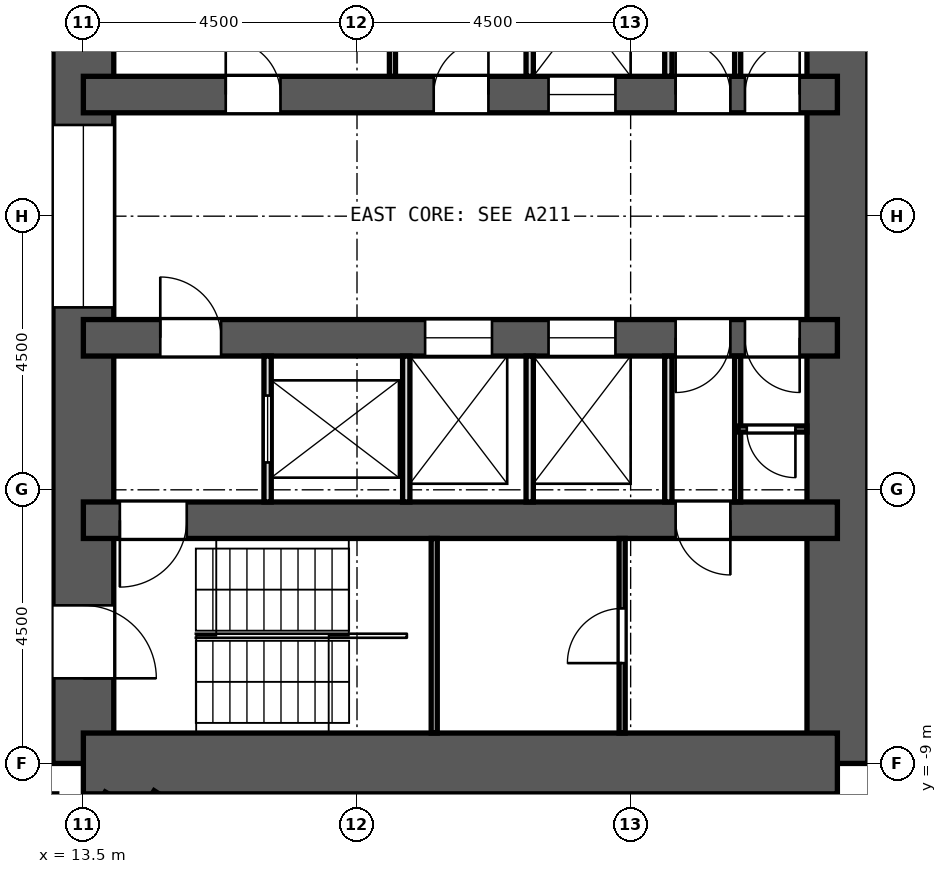
"""IFC4 building model, lengths in metres.
Left out: names, types, materials, properties, quantities, classifications, styles, units other than length and angle.
Written with IfcOpenShell. Run it as: python <this file> out.ifc"""

import sys

from ifc_helpers import new_model, si_unit, direction, frame, frame_2d, origin, place, context, subcontext, project, spatial, rectangle, extrude, element, fill, save


model = new_model("IFC4")
c1 = context("Model", 3, precision=1e-05, world=origin(), true_north=direction((0.0, 1.0)))
c2 = subcontext(c1, "Body", "Model", "MODEL_VIEW")
j1 = project(units=[si_unit("LENGTHUNIT", "METRE"), si_unit("PLANEANGLEUNIT", "RADIAN")], contexts=[c1])
p1 = place(None, origin())
s1 = spatial("IfcSite", under=j1, at=p1, CompositionType="ELEMENT")
p2 = place(p1, origin())
s2 = spatial("IfcBuilding", under=s1, at=p2, CompositionType="ELEMENT")
p3 = place(p2, frame((0.0, 0.0, 46.1)))
s3 = spatial("IfcBuildingStorey", under=s2, at=p3, CompositionType="ELEMENT", Elevation=46.1)
p4 = place(p3, frame((13.5, -9.0, 0.0), z_axis=(0.0, 0.0, 1.0), x_axis=(0.0, 1.0, 0.0)))
e1 = element("IfcWall", 1, at=p4, inside=s3, PredefinedType="SHEAR", context=c2, shape_type="SweptSolid", body=[
    extrude(rectangle(XDim=18.0, YDim=1.0, at=frame_2d((9.0, 0.0))), origin(), (0.0, 0.0, 1.0), 3.3),
])
p5 = place(p4, frame((15.4, 0.0, 0.0)))
e2 = element("IfcOpeningElement", 2, at=p5, cuts=e1, PredefinedType="OPENING", context=c2, shape_type="SweptSolid", body=[
    extrude(rectangle(XDim=1.2, YDim=2.1, at=frame_2d((0.6, 1.05))), frame((0.0, 0.512, 0.0), z_axis=(0.0, -1.0, 0.0), x_axis=(1.0, 0.0, 0.0)), (0.0, 0.0, 1.0), 1.024),
])
p6 = place(p4, frame((1.4, 0.0, 0.0)))
e3 = element("IfcOpeningElement", 3, at=p6, cuts=e1, PredefinedType="OPENING", context=c2, shape_type="SweptSolid", body=[
    extrude(rectangle(XDim=1.2, YDim=2.1, at=frame_2d((0.6, 1.05))), frame((0.0, 0.512, 0.0), z_axis=(0.0, -1.0, 0.0), x_axis=(1.0, 0.0, 0.0)), (0.0, 0.0, 1.0), 1.024),
])
p7 = place(p4, frame((7.5, 0.0, 0.0)))
e4 = element("IfcOpeningElement", 4, at=p7, cuts=e1, PredefinedType="OPENING", context=c2, shape_type="SweptSolid", body=[
    extrude(rectangle(XDim=3.0, YDim=2.4, at=frame_2d((1.5, 1.2))), frame((0.0, 0.512, 0.0), z_axis=(0.0, -1.0, 0.0), x_axis=(1.0, 0.0, 0.0)), (0.0, 0.0, 1.0), 1.024),
])
p8 = place(p3, frame((25.9, -9.0, 0.0), z_axis=(0.0, 0.0, 1.0), x_axis=(0.0, 1.0, 0.0)))
e5 = element("IfcWall", 5, at=p8, inside=s3, PredefinedType="SHEAR", context=c2, shape_type="SweptSolid", body=[
    extrude(rectangle(XDim=18.0, YDim=1.0, at=frame_2d((9.0, 0.0))), origin(), (0.0, 0.0, 1.0), 3.3),
])
p9 = place(p3, frame((13.5, -9.0, 0.0), z_axis=(0.0, 0.0, 1.0), x_axis=(1.0, 0.0, 0.0)))
e6 = element("IfcWall", 6, at=p9, inside=s3, PredefinedType="SHEAR", context=c2, shape_type="SweptSolid", body=[
    extrude(rectangle(XDim=12.4, YDim=1.0, at=frame_2d((6.2, 0.0))), origin(), (0.0, 0.0, 1.0), 3.3),
])
p10 = place(p3, frame((13.5, -5.0, 0.0), z_axis=(0.0, 0.0, 1.0), x_axis=(1.0, 0.0, 0.0)))
e7 = element("IfcWall", 7, at=p10, inside=s3, PredefinedType="SHEAR", context=c2, shape_type="SweptSolid", body=[
    extrude(rectangle(XDim=12.4, YDim=0.6, at=frame_2d((6.2, 0.0))), origin(), (0.0, 0.0, 1.0), 3.3),
])
p11 = place(p10, frame((9.74, 0.0, 0.0)))
e8 = element("IfcOpeningElement", 8, at=p11, cuts=e7, PredefinedType="OPENING", context=c2, shape_type="SweptSolid", body=[
    extrude(rectangle(XDim=0.9, YDim=2.1, at=frame_2d((0.45, 1.05))), frame((0.0, 0.312, 0.0), z_axis=(0.0, -1.0, 0.0), x_axis=(1.0, 0.0, 0.0)), (0.0, 0.0, 1.0), 0.624),
])
p12 = place(p10, frame((0.6, 0.0, 0.0)))
e9 = element("IfcOpeningElement", 9, at=p12, cuts=e7, PredefinedType="OPENING", context=c2, shape_type="SweptSolid", body=[
    extrude(rectangle(XDim=1.1, YDim=2.1, at=frame_2d((0.55, 1.05))), frame((0.0, 0.312, 0.0), z_axis=(0.0, -1.0, 0.0), x_axis=(1.0, 0.0, 0.0)), (0.0, 0.0, 1.0), 0.624),
])
p13 = place(p3, frame((13.5, 2.0, 0.0), z_axis=(0.0, 0.0, 1.0), x_axis=(1.0, 0.0, 0.0)))
e10 = element("IfcWall", 10, at=p13, inside=s3, PredefinedType="SHEAR", context=c2, shape_type="SweptSolid", body=[
    extrude(rectangle(XDim=12.4, YDim=0.6, at=frame_2d((6.2, 0.0))), origin(), (0.0, 0.0, 1.0), 3.3),
])
p14 = place(p13, frame((7.65, 0.0, 0.0)))
e11 = element("IfcOpeningElement", 11, at=p14, cuts=e10, PredefinedType="OPENING", context=c2, shape_type="SweptSolid", body=[
    extrude(rectangle(XDim=1.1, YDim=2.1, at=frame_2d((0.55, 1.05))), frame((0.0, 0.312, 0.0), z_axis=(0.0, -1.0, 0.0), x_axis=(1.0, 0.0, 0.0)), (0.0, 0.0, 1.0), 0.624),
])
p15 = place(p13, frame((2.341, 0.0, 0.0)))
e12 = element("IfcOpeningElement", 12, at=p15, cuts=e10, PredefinedType="OPENING", context=c2, shape_type="SweptSolid", body=[
    extrude(rectangle(XDim=0.9, YDim=2.1, at=frame_2d((0.45, 1.05))), frame((0.0, 0.312, 0.0), z_axis=(0.0, -1.0, 0.0), x_axis=(1.0, 0.0, 0.0)), (0.0, 0.0, 1.0), 0.624),
])
p16 = place(p13, frame((5.761, 0.0, 0.0)))
e13 = element("IfcOpeningElement", 13, at=p16, cuts=e10, PredefinedType="OPENING", context=c2, shape_type="SweptSolid", body=[
    extrude(rectangle(XDim=0.9, YDim=2.1, at=frame_2d((0.45, 1.05))), frame((0.0, 0.312, 0.0), z_axis=(0.0, -1.0, 0.0), x_axis=(1.0, 0.0, 0.0)), (0.0, 0.0, 1.0), 0.624),
])
p17 = place(p13, frame((9.74, 0.0, 0.0)))
e14 = element("IfcOpeningElement", 14, at=p17, cuts=e10, PredefinedType="OPENING", context=c2, shape_type="SweptSolid", body=[
    extrude(rectangle(XDim=0.9, YDim=2.1, at=frame_2d((0.45, 1.05))), frame((0.0, 0.312, 0.0), z_axis=(0.0, -1.0, 0.0), x_axis=(1.0, 0.0, 0.0)), (0.0, 0.0, 1.0), 0.624),
])
p18 = place(p13, frame((10.88, 0.0, 0.0)))
e15 = element("IfcOpeningElement", 15, at=p18, cuts=e10, PredefinedType="OPENING", context=c2, shape_type="SweptSolid", body=[
    extrude(rectangle(XDim=0.9, YDim=2.1, at=frame_2d((0.45, 1.05))), frame((0.0, 0.312, 0.0), z_axis=(0.0, -1.0, 0.0), x_axis=(1.0, 0.0, 0.0)), (0.0, 0.0, 1.0), 0.624),
])
p19 = place(p3, frame((13.5, -2.0, 0.0), z_axis=(0.0, 0.0, 1.0), x_axis=(1.0, 0.0, 0.0)))
e16 = element("IfcWall", 16, at=p19, inside=s3, PredefinedType="SHEAR", context=c2, shape_type="SweptSolid", body=[
    extrude(rectangle(XDim=12.4, YDim=0.6, at=frame_2d((6.2, 0.0))), origin(), (0.0, 0.0, 1.0), 3.3),
])
p20 = place(p19, frame((5.62, 0.0, 0.0)))
e17 = element("IfcOpeningElement", 17, at=p20, cuts=e16, PredefinedType="OPENING", context=c2, shape_type="SweptSolid", body=[
    extrude(rectangle(XDim=1.1, YDim=2.1, at=frame_2d((0.55, 1.05))), frame((0.0, 0.312, 0.0), z_axis=(0.0, -1.0, 0.0), x_axis=(1.0, 0.0, 0.0)), (0.0, 0.0, 1.0), 0.624),
])
p21 = place(p19, frame((7.65, 0.0, 0.0)))
e18 = element("IfcOpeningElement", 18, at=p21, cuts=e16, PredefinedType="OPENING", context=c2, shape_type="SweptSolid", body=[
    extrude(rectangle(XDim=1.1, YDim=2.1, at=frame_2d((0.55, 1.05))), frame((0.0, 0.312, 0.0), z_axis=(0.0, -1.0, 0.0), x_axis=(1.0, 0.0, 0.0)), (0.0, 0.0, 1.0), 0.624),
])
p22 = place(p19, frame((1.265, 0.0, 0.0)))
e19 = element("IfcOpeningElement", 19, at=p22, cuts=e16, PredefinedType="OPENING", context=c2, shape_type="SweptSolid", body=[
    extrude(rectangle(XDim=1.0, YDim=2.1, at=frame_2d((0.5, 1.05))), frame((0.0, 0.312, 0.0), z_axis=(0.0, -1.0, 0.0), x_axis=(1.0, 0.0, 0.0)), (0.0, 0.0, 1.0), 0.624),
])
p23 = place(p19, frame((9.74, 0.0, 0.0)))
e20 = element("IfcOpeningElement", 20, at=p23, cuts=e16, PredefinedType="OPENING", context=c2, shape_type="SweptSolid", body=[
    extrude(rectangle(XDim=0.9, YDim=2.1, at=frame_2d((0.45, 1.05))), frame((0.0, 0.312, 0.0), z_axis=(0.0, -1.0, 0.0), x_axis=(1.0, 0.0, 0.0)), (0.0, 0.0, 1.0), 0.624),
])
p24 = place(p19, frame((10.88, 0.0, 0.0)))
e21 = element("IfcOpeningElement", 21, at=p24, cuts=e16, PredefinedType="OPENING", context=c2, shape_type="SweptSolid", body=[
    extrude(rectangle(XDim=0.9, YDim=2.1, at=frame_2d((0.45, 1.05))), frame((0.0, 0.312, 0.0), z_axis=(0.0, -1.0, 0.0), x_axis=(1.0, 0.0, 0.0)), (0.0, 0.0, 1.0), 0.624),
])
p25 = place(p3, frame((26.208, -11.585, 0.0), z_axis=(0.0, 0.0, 1.0), x_axis=(0.342028474173, 0.939689588564, 0.0)))
e22 = element("IfcWall", 22, at=p25, inside=s3, PredefinedType="SOLIDWALL", context=c2, shape_type="SweptSolid", body=[
    extrude(rectangle(XDim=3.846, YDim=0.6, at=frame_2d((1.923, 0.0))), origin(), (0.0, 0.0, 1.0), 2.75),
])
p26 = place(p3, frame((14.629, -9.5, 0.0), z_axis=(0.0, 0.0, 1.0), x_axis=(0.838795721465, -0.544446267002, 0.0)))
e23 = element("IfcWall", 23, at=p26, inside=s3, PredefinedType="PARTITIONING", context=c2, shape_type="SweptSolid", body=[
    extrude(rectangle(XDim=1.583, YDim=0.125, at=frame_2d((0.792, 0.0))), origin(), (0.0, 0.0, 1.0), 2.75),
])
p27 = place(p3, frame((13.045, -11.005, 0.0), z_axis=(0.0, 0.0, 1.0), x_axis=(0.500066958712, 0.865986741702, 0.0)))
e24 = element("IfcWall", 24, at=p27, inside=s3, PredefinedType="PARTITIONING", context=c2, shape_type="SweptSolid", body=[
    extrude(rectangle(XDim=1.738, YDim=0.125, at=frame_2d((0.869, 0.0))), origin(), (0.0, 0.0, 1.0), 2.75),
])
p28 = place(p3, frame((18.583, 2.3, 0.0), z_axis=(0.0, 0.0, 1.0), x_axis=(0.0, 1.0, 0.0)))
e25 = element("IfcWall", 25, at=p28, inside=s3, PredefinedType="PARTITIONING", context=c2, shape_type="SweptSolid", body=[
    extrude(rectangle(XDim=2.4, YDim=0.1, at=frame_2d((1.2, 0.0))), origin(), (0.0, 0.0, 1.0), 2.75),
])
for number, where, z_axis, x_axis in (
    (26, (20.84, 2.3, 0.0), (0.0, 0.0, 1.0), (0.0, 1.0, 0.0)),
    (27, (23.12, 2.3, 0.0), (0.0, 0.0, 1.0), (0.0, 1.0, 0.0)),
):
    element("IfcWall", number, at=place(p3, frame(where, z_axis=z_axis, x_axis=x_axis)), inside=s3, PredefinedType="PARTITIONING", context=c2, shape_type="SweptSolid", body=[
        extrude(rectangle(XDim=2.4, YDim=0.12, at=frame_2d((1.2, 0.0))), origin(), (0.0, 0.0, 1.0), 2.75),
    ])
p29 = place(p3, frame((24.26, 2.3, 0.0), z_axis=(0.0, 0.0, 1.0), x_axis=(0.0, 1.0, 0.0)))
e28 = element("IfcWall", 28, at=p29, inside=s3, PredefinedType="PARTITIONING", context=c2, shape_type="SweptSolid", body=[
    extrude(rectangle(XDim=2.4, YDim=0.1, at=frame_2d((1.2, 0.0))), origin(), (0.0, 0.0, 1.0), 2.75),
])
p30 = place(p3, frame((16.53, -4.7, 0.0), z_axis=(0.0, 0.0, 1.0), x_axis=(0.0, 1.0, 0.0)))
e29 = element("IfcWall", 29, at=p30, inside=s3, PredefinedType="PARTITIONING", context=c2, shape_type="SweptSolid", body=[
    extrude(rectangle(XDim=2.4, YDim=0.12, at=frame_2d((1.2, 0.0))), origin(), (0.0, 0.0, 1.0), 2.75),
])
p31 = place(p30, frame((0.65, 0.0, 0.0)))
e30 = element("IfcOpeningElement", 30, at=p31, cuts=e29, PredefinedType="OPENING", context=c2, shape_type="SweptSolid", body=[
    extrude(rectangle(XDim=1.1, YDim=2.1, at=frame_2d((0.55, 1.05))), frame((0.0, 0.072, 0.0), z_axis=(0.0, -1.0, 0.0), x_axis=(1.0, 0.0, 0.0)), (0.0, 0.0, 1.0), 0.144),
])
for number, where, z_axis, x_axis in (
    (31, (18.81, -4.7, 0.0), (0.0, 0.0, 1.0), (0.0, 1.0, 0.0)),
    (32, (20.84, -4.7, 0.0), (0.0, 0.0, 1.0), (0.0, 1.0, 0.0)),
    (33, (23.12, -4.7, 0.0), (0.0, 0.0, 1.0), (0.0, 1.0, 0.0)),
):
    element("IfcWall", number, at=place(p3, frame(where, z_axis=z_axis, x_axis=x_axis)), inside=s3, PredefinedType="PARTITIONING", context=c2, shape_type="SweptSolid", body=[
        extrude(rectangle(XDim=2.4, YDim=0.12, at=frame_2d((1.2, 0.0))), origin(), (0.0, 0.0, 1.0), 2.75),
    ])
p32 = place(p3, frame((24.26, -4.7, 0.0), z_axis=(0.0, 0.0, 1.0), x_axis=(0.0, 1.0, 0.0)))
e34 = element("IfcWall", 34, at=p32, inside=s3, PredefinedType="PARTITIONING", context=c2, shape_type="SweptSolid", body=[
    extrude(rectangle(XDim=2.4, YDim=0.1, at=frame_2d((1.2, 0.0))), origin(), (0.0, 0.0, 1.0), 2.75),
])
p33 = place(p3, frame((24.26, -3.5, 0.0), z_axis=(0.0, 0.0, 1.0), x_axis=(1.0, 0.0, 0.0)))
e35 = element("IfcWall", 35, at=p33, inside=s3, PredefinedType="PARTITIONING", context=c2, shape_type="SweptSolid", body=[
    extrude(rectangle(XDim=1.14, YDim=0.1, at=frame_2d((0.57, 0.0))), origin(), (0.0, 0.0, 1.0), 2.75),
])
p34 = place(p33, frame((0.15, 0.0, 0.0)))
e36 = element("IfcOpeningElement", 36, at=p34, cuts=e35, PredefinedType="OPENING", context=c2, shape_type="SweptSolid", body=[
    extrude(rectangle(XDim=0.8, YDim=2.1, at=frame_2d((0.4, 1.05))), frame((0.0, 0.062, 0.0), z_axis=(0.0, -1.0, 0.0), x_axis=(1.0, 0.0, 0.0)), (0.0, 0.0, 1.0), 0.124),
])
p35 = place(p3, frame((19.27, -8.5, 0.0), z_axis=(0.0, 0.0, 1.0), x_axis=(0.0, 1.0, 0.0)))
e37 = element("IfcWall", 37, at=p35, inside=s3, PredefinedType="PARTITIONING", context=c2, shape_type="SweptSolid", body=[
    extrude(rectangle(XDim=3.2, YDim=0.1, at=frame_2d((1.6, 0.0))), origin(), (0.0, 0.0, 1.0), 2.75),
])
p36 = place(p3, frame((22.36, -8.5, 0.0), z_axis=(0.0, 0.0, 1.0), x_axis=(0.0, 1.0, 0.0)))
e38 = element("IfcWall", 38, at=p36, inside=s3, PredefinedType="PARTITIONING", context=c2, shape_type="SweptSolid", body=[
    extrude(rectangle(XDim=3.2, YDim=0.1, at=frame_2d((1.6, 0.0))), origin(), (0.0, 0.0, 1.0), 2.75),
])
p37 = place(p36, frame((1.15, 0.0, 0.0)))
e39 = element("IfcOpeningElement", 39, at=p37, cuts=e38, PredefinedType="OPENING", context=c2, shape_type="SweptSolid", body=[
    extrude(rectangle(XDim=0.9, YDim=2.1, at=frame_2d((0.45, 1.05))), frame((0.0, 0.062, 0.0), z_axis=(0.0, -1.0, 0.0), x_axis=(1.0, 0.0, 0.0)), (0.0, 0.0, 1.0), 0.124),
])
p38 = place(p14, origin())
e40 = element("IfcDoor", 40, at=p38, inside=s3, OperationType="DOUBLE_DOOR_SLIDING", PredefinedType="DOOR", context=c2, shape_type="SweptSolid", body=[
    extrude(rectangle(XDim=1.1, YDim=2.1, at=frame_2d((0.55, 1.05))), frame((0.0, 0.025, 0.0), z_axis=(0.0, -1.0, 0.0), x_axis=(1.0, 0.0, 0.0)), (0.0, 0.0, 1.0), 0.05),
])
fill(e11, e40)
p39 = place(p31, origin())
e41 = element("IfcDoor", 41, at=p39, inside=s3, OperationType="DOUBLE_DOOR_SLIDING", PredefinedType="DOOR", context=c2, shape_type="SweptSolid", body=[
    extrude(rectangle(XDim=1.1, YDim=2.1, at=frame_2d((0.55, 1.05))), frame((0.0, 0.025, 0.0), z_axis=(0.0, -1.0, 0.0), x_axis=(1.0, 0.0, 0.0)), (0.0, 0.0, 1.0), 0.05),
])
fill(e30, e41)
p40 = place(p20, origin())
e42 = element("IfcDoor", 42, at=p40, inside=s3, OperationType="DOUBLE_DOOR_SLIDING", PredefinedType="DOOR", context=c2, shape_type="SweptSolid", body=[
    extrude(rectangle(XDim=1.1, YDim=2.1, at=frame_2d((0.55, 1.05))), frame((0.0, 0.025, 0.0), z_axis=(0.0, -1.0, 0.0), x_axis=(1.0, 0.0, 0.0)), (0.0, 0.0, 1.0), 0.05),
])
fill(e17, e42)
p41 = place(p21, origin())
e43 = element("IfcDoor", 43, at=p41, inside=s3, OperationType="DOUBLE_DOOR_SLIDING", PredefinedType="DOOR", context=c2, shape_type="SweptSolid", body=[
    extrude(rectangle(XDim=1.1, YDim=2.1, at=frame_2d((0.55, 1.05))), frame((0.0, 0.025, 0.0), z_axis=(0.0, -1.0, 0.0), x_axis=(1.0, 0.0, 0.0)), (0.0, 0.0, 1.0), 0.05),
])
fill(e18, e43)
p42 = place(p15, origin())
e44 = element("IfcDoor", 44, at=p42, inside=s3, OperationType="SINGLE_SWING_LEFT", PredefinedType="DOOR", context=c2, shape_type="SweptSolid", body=[
    extrude(rectangle(XDim=0.9, YDim=2.1, at=frame_2d((0.45, 1.05))), frame((0.0, 0.025, 0.0), z_axis=(0.0, -1.0, 0.0), x_axis=(1.0, 0.0, 0.0)), (0.0, 0.0, 1.0), 0.05),
])
fill(e12, e44)
p43 = place(p16, origin())
e45 = element("IfcDoor", 45, at=p43, inside=s3, OperationType="SINGLE_SWING_RIGHT", PredefinedType="DOOR", context=c2, shape_type="SweptSolid", body=[
    extrude(rectangle(XDim=0.9, YDim=2.1, at=frame_2d((0.45, 1.05))), frame((0.0, 0.025, 0.0), z_axis=(0.0, -1.0, 0.0), x_axis=(1.0, 0.0, 0.0)), (0.0, 0.0, 1.0), 0.05),
])
fill(e13, e45)
p44 = place(p17, origin())
e46 = element("IfcDoor", 46, at=p44, inside=s3, OperationType="SINGLE_SWING_LEFT", PredefinedType="DOOR", context=c2, shape_type="SweptSolid", body=[
    extrude(rectangle(XDim=0.9, YDim=2.1, at=frame_2d((0.45, 1.05))), frame((0.0, 0.025, 0.0), z_axis=(0.0, -1.0, 0.0), x_axis=(1.0, 0.0, 0.0)), (0.0, 0.0, 1.0), 0.05),
])
fill(e14, e46)
p45 = place(p18, origin())
e47 = element("IfcDoor", 47, at=p45, inside=s3, OperationType="SINGLE_SWING_RIGHT", PredefinedType="DOOR", context=c2, shape_type="SweptSolid", body=[
    extrude(rectangle(XDim=0.9, YDim=2.1, at=frame_2d((0.45, 1.05))), frame((0.0, 0.025, 0.0), z_axis=(0.0, -1.0, 0.0), x_axis=(1.0, 0.0, 0.0)), (0.0, 0.0, 1.0), 0.05),
])
fill(e15, e47)
p46 = place(p22, origin())
e48 = element("IfcDoor", 48, at=p46, inside=s3, OperationType="SINGLE_SWING_LEFT", PredefinedType="DOOR", context=c2, shape_type="SweptSolid", body=[
    extrude(rectangle(XDim=1.0, YDim=2.1, at=frame_2d((0.5, 1.05))), frame((0.0, 0.025, 0.0), z_axis=(0.0, -1.0, 0.0), x_axis=(1.0, 0.0, 0.0)), (0.0, 0.0, 1.0), 0.05),
])
fill(e19, e48)
p47 = place(p23, frame((0.9, 0.0, 0.0), z_axis=(0.0, 0.0, 1.0), x_axis=(-1.0, 0.0, 0.0)))
e49 = element("IfcDoor", 49, at=p47, inside=s3, OperationType="SINGLE_SWING_RIGHT", PredefinedType="DOOR", context=c2, shape_type="SweptSolid", body=[
    extrude(rectangle(XDim=0.9, YDim=2.1, at=frame_2d((0.45, 1.05))), frame((0.0, 0.025, 0.0), z_axis=(0.0, -1.0, 0.0), x_axis=(1.0, 0.0, 0.0)), (0.0, 0.0, 1.0), 0.05),
])
fill(e20, e49)
p48 = place(p24, frame((0.9, 0.0, 0.0), z_axis=(0.0, 0.0, 1.0), x_axis=(-1.0, 0.0, 0.0)))
e50 = element("IfcDoor", 50, at=p48, inside=s3, OperationType="SINGLE_SWING_LEFT", PredefinedType="DOOR", context=c2, shape_type="SweptSolid", body=[
    extrude(rectangle(XDim=0.9, YDim=2.1, at=frame_2d((0.45, 1.05))), frame((0.0, 0.025, 0.0), z_axis=(0.0, -1.0, 0.0), x_axis=(1.0, 0.0, 0.0)), (0.0, 0.0, 1.0), 0.05),
])
fill(e21, e50)
p49 = place(p34, frame((0.8, 0.0, 0.0), z_axis=(0.0, 0.0, 1.0), x_axis=(-1.0, 0.0, 0.0)))
e51 = element("IfcDoor", 51, at=p49, inside=s3, OperationType="SINGLE_SWING_LEFT", PredefinedType="DOOR", context=c2, shape_type="SweptSolid", body=[
    extrude(rectangle(XDim=0.8, YDim=2.1, at=frame_2d((0.4, 1.05))), frame((0.0, 0.025, 0.0), z_axis=(0.0, -1.0, 0.0), x_axis=(1.0, 0.0, 0.0)), (0.0, 0.0, 1.0), 0.05),
])
fill(e36, e51)
p50 = place(p37, origin())
e52 = element("IfcDoor", 52, at=p50, inside=s3, OperationType="SINGLE_SWING_LEFT", PredefinedType="DOOR", context=c2, shape_type="SweptSolid", body=[
    extrude(rectangle(XDim=0.9, YDim=2.1, at=frame_2d((0.45, 1.05))), frame((0.0, 0.025, 0.0), z_axis=(0.0, -1.0, 0.0), x_axis=(1.0, 0.0, 0.0)), (0.0, 0.0, 1.0), 0.05),
])
fill(e39, e52)
p51 = place(p11, frame((0.9, 0.0, 0.0), z_axis=(0.0, 0.0, 1.0), x_axis=(-1.0, 0.0, 0.0)))
e53 = element("IfcDoor", 53, at=p51, inside=s3, OperationType="SINGLE_SWING_LEFT", PredefinedType="DOOR", context=c2, shape_type="SweptSolid", body=[
    extrude(rectangle(XDim=0.9, YDim=2.1, at=frame_2d((0.45, 1.05))), frame((0.0, 0.025, 0.0), z_axis=(0.0, -1.0, 0.0), x_axis=(1.0, 0.0, 0.0)), (0.0, 0.0, 1.0), 0.05),
])
fill(e8, e53)
p52 = place(p12, frame((1.1, 0.0, 0.0), z_axis=(0.0, 0.0, 1.0), x_axis=(-1.0, 0.0, 0.0)))
e54 = element("IfcDoor", 54, at=p52, inside=s3, OperationType="SINGLE_SWING_RIGHT", PredefinedType="DOOR", context=c2, shape_type="SweptSolid", body=[
    extrude(rectangle(XDim=1.1, YDim=2.1, at=frame_2d((0.55, 1.05))), frame((0.0, 0.025, 0.0), z_axis=(0.0, -1.0, 0.0), x_axis=(1.0, 0.0, 0.0)), (0.0, 0.0, 1.0), 0.05),
])
fill(e9, e54)
p53 = place(p6, frame((1.2, 0.0, 0.0), z_axis=(0.0, 0.0, 1.0), x_axis=(-1.0, 0.0, 0.0)))
e55 = element("IfcDoor", 55, at=p53, inside=s3, OperationType="SINGLE_SWING_RIGHT", PredefinedType="DOOR", context=c2, shape_type="SweptSolid", body=[
    extrude(rectangle(XDim=1.2, YDim=2.1, at=frame_2d((0.6, 1.05))), frame((0.0, 0.025, 0.0), z_axis=(0.0, -1.0, 0.0), x_axis=(1.0, 0.0, 0.0)), (0.0, 0.0, 1.0), 0.05),
])
fill(e3, e55)
p54 = place(p7, origin())
e56 = element("IfcDoor", 56, at=p54, inside=s3, OperationType="DOUBLE_DOOR_SLIDING", PredefinedType="DOOR", context=c2, shape_type="SweptSolid", body=[
    extrude(rectangle(XDim=3.0, YDim=2.4, at=frame_2d((1.5, 1.2))), frame((0.0, 0.025, 0.0), z_axis=(0.0, -1.0, 0.0), x_axis=(1.0, 0.0, 0.0)), (0.0, 0.0, 1.0), 0.05),
])
fill(e4, e56)
save(model, sys.argv[1])
